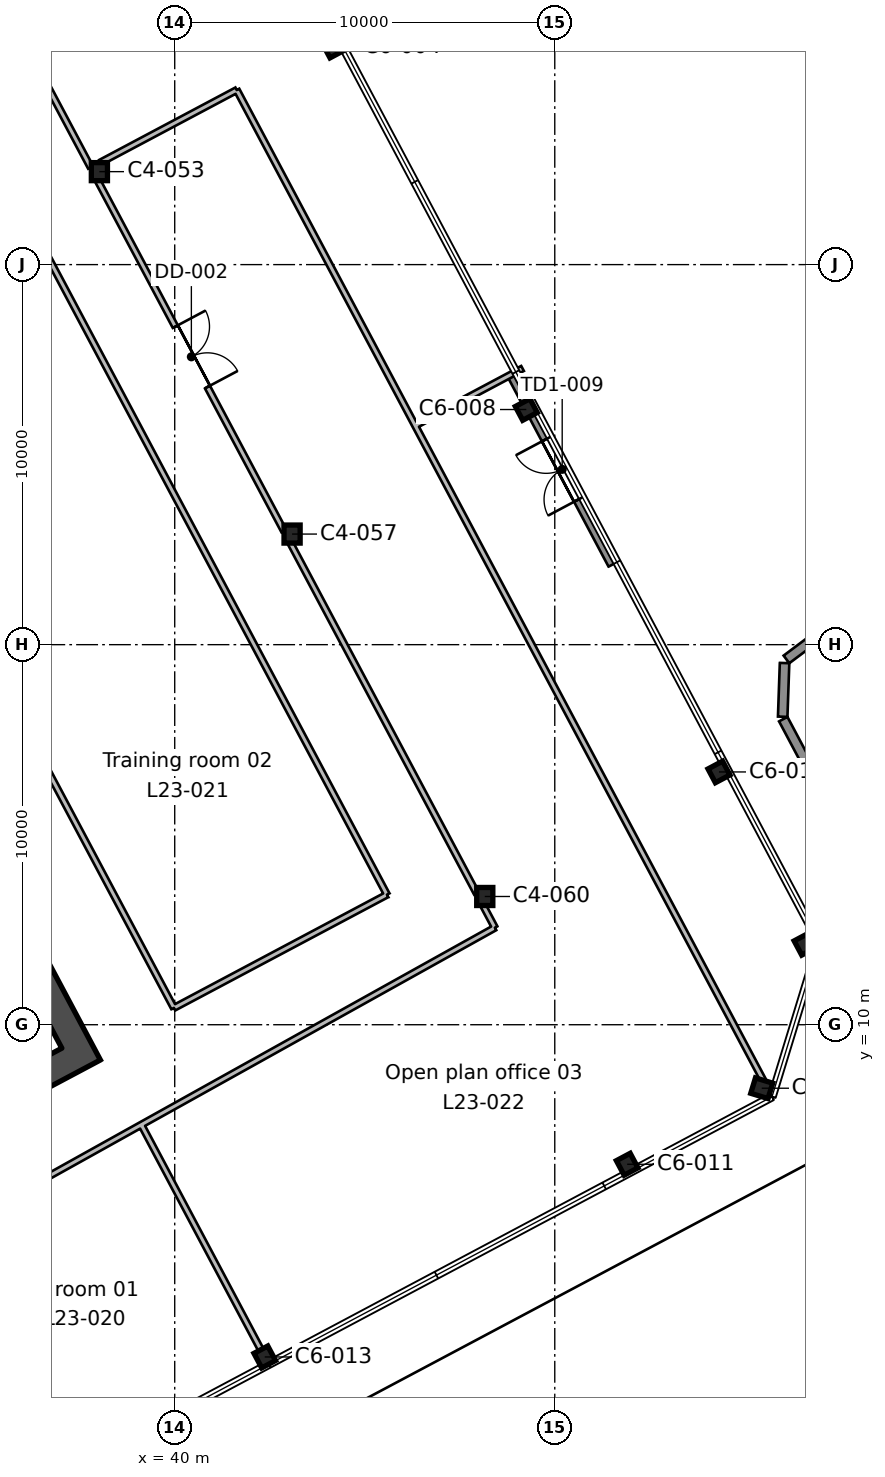
"""IFC4 building model, lengths in metres.
Left out: names, types, materials, properties, quantities, classifications, styles, units other than length and angle.
Written with IfcOpenShell. Run it as: python <this file> out.ifc"""

import sys

from ifc_helpers import new_model, si_unit, direction, frame, frame_2d, origin, origin_2d, place, context, subcontext, project, spatial, rectangle, i_section, extrude, element, fill, save


model = new_model("IFC4")
c1 = context("Model", 3, precision=1e-05, world=origin(), true_north=direction((0.0, 1.0)))
c2 = subcontext(c1, "Body", "Model", "MODEL_VIEW")
j1 = project(units=[si_unit("LENGTHUNIT", "METRE"), si_unit("PLANEANGLEUNIT", "RADIAN")], contexts=[c1])
p1 = place(None, origin())
s1 = spatial("IfcSite", under=j1, at=p1, CompositionType="ELEMENT")
p2 = place(p1, origin())
s2 = spatial("IfcBuilding", under=s1, at=p2, CompositionType="ELEMENT")
p3 = place(p2, frame((0.0, 0.0, 118.2)))
s3 = spatial("IfcBuildingStorey", under=s2, at=p3, CompositionType="ELEMENT", Elevation=118.2)
for number, where, z_axis, x_axis in (
    (1, (42.369, 1.258, 0.0), (0.0, 0.0, 1.0), (0.883, 0.469, 0.0)),
    (2, (51.905, 6.328, 0.0), (0.0, 0.0, 1.0), (0.883, 0.469, 0.0)),
):
    element("IfcColumn", number, at=place(p3, frame(where, z_axis=z_axis, x_axis=x_axis)), inside=s3, PredefinedType="COLUMN", context=c2, shape_type="SweptSolid", body=[
        extrude(i_section(OverallWidth=0.412, OverallDepth=0.434, WebThickness=0.036, FlangeThickness=0.057, FilletRadius=0.015, at=origin_2d()), origin(), (0.0, 0.0, 1.0), 4.0),
    ])
for number, where, z_axis, x_axis in (
    (3, (55.446, 8.329, 0.0), (0.0, 0.0, 1.0), (0.292, 0.956, 0.0)),
    (4, (56.608, 12.13, 0.0), (0.0, 0.0, 1.0), (-0.469, 0.883, 0.0)),
    (5, (48.158, 13.374, 0.0), (0.0, 0.0, 1.0), (1.0, 0.0, 0.0)),
):
    element("IfcColumn", number, at=place(p3, frame(where, z_axis=z_axis, x_axis=x_axis)), inside=s3, PredefinedType="COLUMN", context=c2, shape_type="SweptSolid", body=[
        extrude(i_section(OverallWidth=0.424, OverallDepth=0.475, WebThickness=0.048, FlangeThickness=0.077, FilletRadius=0.015, at=origin_2d()), origin(), (0.0, 0.0, 1.0), 4.0),
    ])
p4 = place(p3, frame((54.321, 16.651, 0.0), z_axis=(0.0, 0.0, 1.0), x_axis=(-0.469471562786, 0.882947592859, 0.0)))
e6 = element("IfcColumn", 6, at=p4, inside=s3, PredefinedType="COLUMN", context=c2, shape_type="SweptSolid", body=[
    extrude(i_section(OverallWidth=0.412, OverallDepth=0.434, WebThickness=0.036, FlangeThickness=0.057, FilletRadius=0.015, at=origin_2d()), origin(), (0.0, 0.0, 1.0), 4.0),
])
p5 = place(p3, frame((43.088, 22.91, 0.0), z_axis=(0.0, 0.0, 1.0), x_axis=(1.0, 0.0, 0.0)))
e7 = element("IfcColumn", 7, at=p5, inside=s3, PredefinedType="COLUMN", context=c2, shape_type="SweptSolid", body=[
    extrude(i_section(OverallWidth=0.424, OverallDepth=0.475, WebThickness=0.048, FlangeThickness=0.077, FilletRadius=0.015, at=origin_2d()), origin(), (0.0, 0.0, 1.0), 4.0),
])
p6 = place(p3, frame((49.251, 26.187, 0.0), z_axis=(0.0, 0.0, 1.0), x_axis=(-0.469471562786, 0.882947592859, 0.0)))
e8 = element("IfcColumn", 8, at=p6, inside=s3, PredefinedType="COLUMN", context=c2, shape_type="SweptSolid", body=[
    extrude(i_section(OverallWidth=0.412, OverallDepth=0.434, WebThickness=0.036, FlangeThickness=0.057, FilletRadius=0.015, at=origin_2d()), origin(), (0.0, 0.0, 1.0), 4.0),
])
p7 = place(p3, frame((38.018, 32.446, 0.0), z_axis=(0.0, 0.0, 1.0), x_axis=(1.0, 0.0, 0.0)))
e9 = element("IfcColumn", 9, at=p7, inside=s3, PredefinedType="COLUMN", context=c2, shape_type="SweptSolid", body=[
    extrude(i_section(OverallWidth=0.424, OverallDepth=0.475, WebThickness=0.048, FlangeThickness=0.077, FilletRadius=0.015, at=origin_2d()), origin(), (0.0, 0.0, 1.0), 4.0),
])
p8 = place(p3, frame((44.181, 35.723, 0.0), z_axis=(0.0, 0.0, 1.0), x_axis=(-0.469471562786, 0.882947592859, 0.0)))
e10 = element("IfcColumn", 10, at=p8, inside=s3, PredefinedType="COLUMN", context=c2, shape_type="SweptSolid", body=[
    extrude(i_section(OverallWidth=0.412, OverallDepth=0.434, WebThickness=0.036, FlangeThickness=0.057, FilletRadius=0.015, at=origin_2d()), origin(), (0.0, 0.0, 1.0), 4.0),
])
p9 = place(p3, frame((37.713, 8.896, 0.0), z_axis=(0.0, 0.0, 1.0), x_axis=(-0.469469918705, 0.88294846703, 0.0)))
e11 = element("IfcWall", 11, at=p9, inside=s3, PredefinedType="SHEAR", context=c2, shape_type="SweptSolid", body=[
    extrude(rectangle(XDim=19.7, YDim=0.75, at=frame_2d((9.85, 0.0))), origin(), (0.0, 0.0, 1.0), 4.0),
])
p10 = place(p9, frame((10.45, 0.0, 0.0)))
e12 = element("IfcOpeningElement", 12, at=p10, cuts=e11, PredefinedType="OPENING", context=c2, shape_type="SweptSolid", body=[
    extrude(rectangle(XDim=2.4, YDim=2.4, at=frame_2d((1.2, 1.2))), frame((0.0, 0.385, 0.0), z_axis=(0.0, -1.0, 0.0), x_axis=(1.0, 0.0, 0.0)), (0.0, 0.0, 1.0), 0.77),
])
p11 = place(p3, frame((19.37, -0.432, 0.0), z_axis=(0.0, 0.0, 1.0), x_axis=(0.88294509198, 0.469476266226, 0.0)))
e13 = element("IfcWall", 13, at=p11, inside=s3, PredefinedType="SHEAR", context=c2, shape_type="SweptSolid", body=[
    extrude(rectangle(XDim=20.2, YDim=0.75, at=frame_2d((10.1, 0.0))), origin(), (0.0, 0.0, 1.0), 4.0),
])
p12 = place(p3, frame((58.857, 12.69, 0.0), z_axis=(0.0, 0.0, 1.0), x_axis=(-0.469488031835, 0.882938835913, 0.0)))
e14 = element("IfcWall", 14, at=p12, inside=s3, PredefinedType="STANDARD", context=c2, shape_type="SweptSolid", body=[
    extrude(rectangle(XDim=6.06, YDim=0.25, at=frame_2d((3.03, 0.0))), origin(), (0.0, 0.0, 1.0), 0.65),
])
p13 = place(p3, frame((55.997, 18.104, 0.0), z_axis=(0.0, 0.0, 1.0), x_axis=(0.034718082661, 0.999397145651, 0.0)))
e15 = element("IfcWall", 15, at=p13, inside=s3, PredefinedType="STANDARD", context=c2, shape_type="SweptSolid", body=[
    extrude(rectangle(XDim=1.413, YDim=0.25, at=frame_2d((0.707, 0.0))), origin(), (0.0, 0.0, 1.0), 0.65),
])
p14 = place(p3, frame((56.096, 19.612, 0.0), z_axis=(0.0, 0.0, 1.0), x_axis=(0.8, 0.6, 0.0)))
e16 = element("IfcWall", 16, at=p14, inside=s3, PredefinedType="STANDARD", context=c2, shape_type="SweptSolid", body=[
    extrude(rectangle(XDim=1.182, YDim=0.25, at=frame_2d((0.591, 0.0))), origin(), (0.0, 0.0, 1.0), 0.65),
])
p15 = place(p3, frame((51.525, 22.111, 0.0), z_axis=(0.0, 0.0, 1.0), x_axis=(-0.469442908777, 0.88296282787, 0.0)))
e17 = element("IfcWall", 17, at=p15, inside=s3, PredefinedType="STANDARD", context=c2, shape_type="SweptSolid", body=[
    extrude(rectangle(XDim=5.667, YDim=0.25, at=frame_2d((2.833, 0.0))), origin(), (0.0, 0.0, 1.0), 2.619),
])
p16 = place(p15, frame((1.933, 0.0, 0.0)))
e18 = element("IfcOpeningElement", 18, at=p16, cuts=e17, PredefinedType="OPENING", context=c2, shape_type="SweptSolid", body=[
    extrude(rectangle(XDim=1.8, YDim=2.4, at=frame_2d((0.9, 1.2))), frame((0.0, 0.135, 0.0), z_axis=(0.0, -1.0, 0.0), x_axis=(1.0, 0.0, 0.0)), (0.0, 0.0, 1.0), 0.27),
])
p17 = place(p3, frame((37.789, 32.557, 0.0), z_axis=(0.0, 0.0, 1.0), x_axis=(-0.469557862383, 0.882901701139, 0.0)))
e19 = element("IfcWall", 19, at=p17, inside=s3, PredefinedType="PARTITIONING", context=c2, shape_type="SweptSolid", body=[
    extrude(rectangle(XDim=2.645, YDim=0.15, at=frame_2d((1.323, 0.0))), origin(), (0.0, 0.0, 1.0), 3.64),
])
p18 = place(p3, frame((39.137, 7.378, 0.0), z_axis=(0.0, 0.0, 1.0), x_axis=(-0.873590594154, -0.486661559819, 0.0)))
e20 = element("IfcWall", 20, at=p18, inside=s3, PredefinedType="PARTITIONING", context=c2, shape_type="SweptSolid", body=[
    extrude(rectangle(XDim=17.373, YDim=0.15, at=frame_2d((8.687, 0.0))), origin(), (0.0, 0.0, 1.0), 3.64),
])
p19 = place(p18, frame((8.151, 0.0, 0.0)))
e21 = element("IfcOpeningElement", 21, at=p19, cuts=e20, PredefinedType="OPENING", context=c2, shape_type="SweptSolid", body=[
    extrude(rectangle(XDim=1.0, YDim=2.1, at=frame_2d((0.5, 1.05))), frame((0.0, 0.085, 0.0), z_axis=(0.0, -1.0, 0.0), x_axis=(1.0, 0.0, 0.0)), (0.0, 0.0, 1.0), 0.17),
])
p20 = place(p3, frame((39.12, 7.369, 0.0), z_axis=(0.0, 0.0, 1.0), x_axis=(0.469275929095, -0.88305158534, 0.0)))
e22 = element("IfcWall", 22, at=p20, inside=s3, PredefinedType="PARTITIONING", context=c2, shape_type="SweptSolid", body=[
    extrude(rectangle(XDim=6.704, YDim=0.15, at=frame_2d((3.352, 0.0))), origin(), (0.0, 0.0, 1.0), 3.64),
])
p21 = place(p3, frame((46.081, 26.226, 0.0), z_axis=(0.0, 0.0, 1.0), x_axis=(-0.469444635522, 0.882961909812, 0.0)))
e23 = element("IfcWall", 23, at=p21, inside=s3, PredefinedType="PARTITIONING", context=c2, shape_type="SweptSolid", body=[
    extrude(rectangle(XDim=9.477, YDim=0.15, at=frame_2d((4.739, 0.0))), origin(), (0.0, 0.0, 1.0), 3.64),
])
p22 = place(p3, frame((41.632, 34.594, 0.0), z_axis=(0.0, 0.0, 1.0), x_axis=(-0.88295491585, -0.469457789984, 0.0)))
e24 = element("IfcWall", 24, at=p22, inside=s3, PredefinedType="PARTITIONING", context=c2, shape_type="SweptSolid", body=[
    extrude(rectangle(XDim=4.07, YDim=0.15, at=frame_2d((2.035, 0.0))), origin(), (0.0, 0.0, 1.0), 3.64),
])
p23 = place(p3, frame((37.973, 32.209, 0.0), z_axis=(0.0, 0.0, 1.0), x_axis=(0.469526119231, -0.88291858252, 0.0)))
e25 = element("IfcWall", 25, at=p23, inside=s3, PredefinedType="PARTITIONING", context=c2, shape_type="SweptSolid", body=[
    extrude(rectangle(XDim=10.443, YDim=0.15, at=frame_2d((5.221, 0.0))), origin(), (0.0, 0.0, 1.0), 3.64),
])
p24 = place(p23, frame((4.35, 0.0, 0.0)))
e26 = element("IfcOpeningElement", 26, at=p24, cuts=e25, PredefinedType="OPENING", context=c2, shape_type="SweptSolid", body=[
    extrude(rectangle(XDim=1.8, YDim=2.1, at=frame_2d((0.9, 1.05))), frame((0.0, 0.085, 0.0), z_axis=(0.0, -1.0, 0.0), x_axis=(1.0, 0.0, 0.0)), (0.0, 0.0, 1.0), 0.17),
])
p25 = place(p3, frame((43.044, 22.672, 0.0), z_axis=(0.0, 0.0, 1.0), x_axis=(0.469530755038, -0.882916117235, 0.0)))
e27 = element("IfcWall", 27, at=p25, inside=s3, PredefinedType="PARTITIONING", context=c2, shape_type="SweptSolid", body=[
    extrude(rectangle(XDim=10.44, YDim=0.15, at=frame_2d((5.22, 0.0))), origin(), (0.0, 0.0, 1.0), 3.64),
])
p26 = place(p3, frame((48.115, 13.136, 0.0), z_axis=(0.0, 0.0, 1.0), x_axis=(0.469551655302, -0.882905002253, 0.0)))
e28 = element("IfcWall", 28, at=p26, inside=s3, PredefinedType="PARTITIONING", context=c2, shape_type="SweptSolid", body=[
    extrude(rectangle(XDim=0.66, YDim=0.15, at=frame_2d((0.33, 0.0))), origin(), (0.0, 0.0, 1.0), 3.64),
])
p27 = place(p3, frame((48.425, 12.553, 0.0), z_axis=(0.0, 0.0, 1.0), x_axis=(-0.873557655627, -0.486720682009, 0.0)))
e29 = element("IfcWall", 29, at=p27, inside=s3, PredefinedType="PARTITIONING", context=c2, shape_type="SweptSolid", body=[
    extrude(rectangle(XDim=10.633, YDim=0.15, at=frame_2d((5.316, 0.0))), origin(), (0.0, 0.0, 1.0), 3.64),
])
p28 = place(p3, frame((46.081, 26.226, 0.0), z_axis=(0.0, 0.0, 1.0), x_axis=(0.469497962096, -0.88293355559, 0.0)))
e30 = element("IfcWall", 30, at=p28, inside=s3, PredefinedType="PARTITIONING", context=c2, shape_type="SweptSolid", body=[
    extrude(rectangle(XDim=20.032, YDim=0.15, at=frame_2d((10.016, 0.0))), origin(), (0.0, 0.0, 1.0), 3.64),
])
p29 = place(p3, frame((49.152, 27.268, 0.0), z_axis=(0.0, 0.0, 1.0), x_axis=(-0.882819217955, -0.469712921271, 0.0)))
e31 = element("IfcWall", 31, at=p29, inside=s3, PredefinedType="PARTITIONING", context=c2, shape_type="SweptSolid", body=[
    extrude(rectangle(XDim=3.2, YDim=0.15, at=frame_2d((1.6, 0.0))), origin(), (0.0, 0.0, 1.0), 3.64),
])
p30 = place(p3, frame((35.679, 32.052, 0.0), z_axis=(0.0, 0.0, 1.0), x_axis=(0.469483439962, -0.88294127755, 0.0)))
e32 = element("IfcWall", 32, at=p30, inside=s3, PredefinedType="PARTITIONING", context=c2, shape_type="SweptSolid", body=[
    extrude(rectangle(XDim=21.1, YDim=0.15, at=frame_2d((10.55, 0.0))), origin(), (0.0, 0.0, 1.0), 3.64),
])
p31 = place(p3, frame((45.585, 13.422, 0.0), z_axis=(0.0, 0.0, 1.0), x_axis=(-0.88295139861, -0.469464405139, 0.0)))
e33 = element("IfcWall", 33, at=p31, inside=s3, PredefinedType="PARTITIONING", context=c2, shape_type="SweptSolid", body=[
    extrude(rectangle(XDim=6.35, YDim=0.15, at=frame_2d((3.175, 0.0))), origin(), (0.0, 0.0, 1.0), 3.64),
])
p32 = place(p3, frame((39.978, 10.441, 0.0), z_axis=(0.0, 0.0, 1.0), x_axis=(-0.469478643621, 0.882943827876, 0.0)))
e34 = element("IfcWall", 34, at=p32, inside=s3, PredefinedType="PARTITIONING", context=c2, shape_type="SweptSolid", body=[
    extrude(rectangle(XDim=21.1, YDim=0.15, at=frame_2d((10.55, 0.0))), origin(), (0.0, 0.0, 1.0), 3.64),
])
p33 = place(p16, origin())
e35 = element("IfcDoor", 35, at=p33, inside=s3, OperationType="DOUBLE_DOOR_SINGLE_SWING", PredefinedType="DOOR", context=c2, shape_type="SweptSolid", body=[
    extrude(rectangle(XDim=1.8, YDim=2.4, at=frame_2d((0.9, 1.2))), frame((0.0, 0.025, 0.0), z_axis=(0.0, -1.0, 0.0), x_axis=(1.0, 0.0, 0.0)), (0.0, 0.0, 1.0), 0.05),
])
fill(e18, e35)
p34 = place(p24, origin())
e36 = element("IfcDoor", 36, at=p34, inside=s3, OperationType="DOUBLE_DOOR_SINGLE_SWING", PredefinedType="DOOR", context=c2, shape_type="SweptSolid", body=[
    extrude(rectangle(XDim=1.8, YDim=2.1, at=frame_2d((0.9, 1.05))), frame((0.0, 0.025, 0.0), z_axis=(0.0, -1.0, 0.0), x_axis=(1.0, 0.0, 0.0)), (0.0, 0.0, 1.0), 0.05),
])
fill(e26, e36)
save(model, sys.argv[1])
